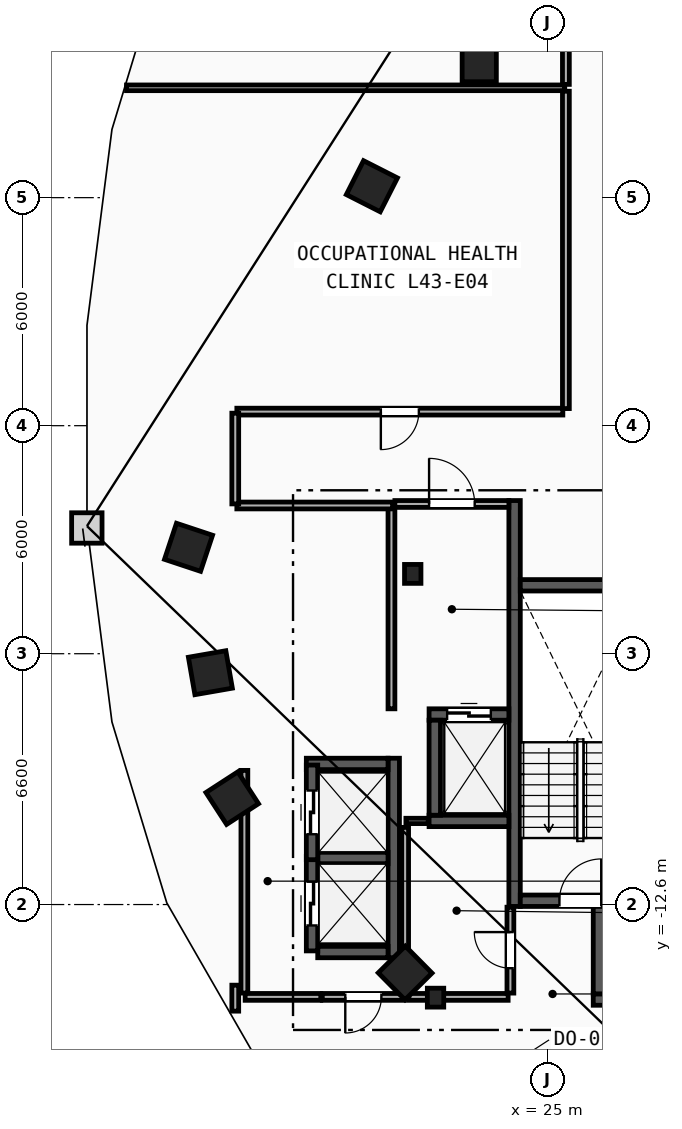
"""IFC4 building model, lengths in metres.
Left out: names, types, materials, properties, quantities, classifications, styles, units other than length and angle.
Written with IfcOpenShell. Run it as: python <this file> out.ifc"""

import sys

from ifc_helpers import new_model, si_unit, direction, frame, frame_2d, origin, origin_2d, place, context, subcontext, project, spatial, rectangle, i_section, extrude, element, fill, save


model = new_model("IFC4")
c1 = context("Model", 3, precision=1e-05, world=origin(), true_north=direction((0.0, 1.0)))
c2 = subcontext(c1, "Body", "Model", "MODEL_VIEW")
j1 = project(units=[si_unit("LENGTHUNIT", "METRE"), si_unit("PLANEANGLEUNIT", "RADIAN")], contexts=[c1])
p1 = place(None, origin())
s1 = spatial("IfcSite", under=j1, at=p1, CompositionType="ELEMENT")
p2 = place(p1, origin())
s2 = spatial("IfcBuilding", under=s1, at=p2, CompositionType="ELEMENT")
p3 = place(p2, frame((0.0, 0.0, 165.6)))
s3 = spatial("IfcBuildingStorey", under=s2, at=p3, CompositionType="ELEMENT", Elevation=165.6)
for number, where, z_axis, x_axis in (
    (1, (21.45, -3.9, 0.0), (0.0, 0.0, 1.0), (1.0, 0.0, 0.0)),
    (2, (22.05, -15.05, 0.0), (0.0, 0.0, 1.0), (1.0, 0.0, 0.0)),
):
    element("IfcColumn", number, at=place(p3, frame(where, z_axis=z_axis, x_axis=x_axis)), inside=s3, PredefinedType="COLUMN", context=c2, shape_type="SweptSolid", body=[
        extrude(i_section(OverallWidth=0.432, OverallDepth=0.498, WebThickness=0.056, FlangeThickness=0.089, FilletRadius=0.018, at=origin_2d()), origin(), (0.0, 0.0, 1.0), 3.6),
    ])
p4 = place(p3, frame((23.2, 9.5, 0.0), z_axis=(0.0, 0.0, 1.0), x_axis=(1.0, 0.0, 0.0)))
e3 = element("IfcColumn", 3, at=p4, inside=s3, PredefinedType="COLUMN", context=c2, shape_type="SweptSolid", body=[
    extrude(rectangle(XDim=0.9, YDim=0.9, at=origin_2d()), origin(), (0.0, 0.0, 1.0), 3.6),
])
for number, where, z_axis, x_axis in (
    (4, (15.55, -3.2, 0.0), (0.0, 0.0, 1.0), (-0.315, -0.949, 0.0)),
    (5, (16.125, -6.5, 0.0), (0.0, 0.0, 1.0), (0.172, -0.985, 0.0)),
    (6, (16.7, -9.8, 0.0), (0.0, 0.0, 1.0), (0.544, -0.839, 0.0)),
    (7, (21.25, -14.4, 0.0), (0.0, 0.0, 1.0), (0.703, -0.711, 0.0)),
    (8, (20.375, 6.3, 0.0), (0.0, 0.0, 1.0), (-0.453, -0.892, 0.0)),
):
    element("IfcColumn", number, at=place(p3, frame(where, z_axis=z_axis, x_axis=x_axis)), inside=s3, PredefinedType="COLUMN", context=c2, shape_type="SweptSolid", body=[
        extrude(rectangle(XDim=1.0, YDim=1.0, at=origin_2d()), origin(), (0.0, 0.0, 1.0), 3.6),
    ])
p5 = place(p3, frame((24.13, -12.65, 0.0), z_axis=(0.0, 0.0, 1.0), x_axis=(0.0, 1.0, 0.0)))
e9 = element("IfcWall", 9, at=p5, inside=s3, PredefinedType="SHEAR", context=c2, shape_type="SweptSolid", body=[
    extrude(rectangle(XDim=10.68, YDim=0.3, at=frame_2d((5.34, 0.0))), origin(), (0.0, 0.0, 1.0), 3.36),
])
p6 = place(p3, frame((24.28, -12.5, 0.0), z_axis=(0.0, 0.0, 1.0), x_axis=(1.0, 0.0, 0.0)))
e10 = element("IfcWall", 10, at=p6, inside=s3, PredefinedType="SHEAR", context=c2, shape_type="SweptSolid", body=[
    extrude(rectangle(XDim=3.16, YDim=0.3, at=frame_2d((1.58, 0.0))), origin(), (0.0, 0.0, 1.0), 3.36),
])
p7 = place(p6, frame((1.03, 0.0, 0.0)))
e11 = element("IfcOpeningElement", 11, at=p7, cuts=e10, PredefinedType="OPENING", context=c2, shape_type="SweptSolid", body=[
    extrude(rectangle(XDim=1.1, YDim=2.15, at=frame_2d((0.55, 1.075))), frame((0.0, 0.16, 0.0), z_axis=(0.0, -1.0, 0.0), x_axis=(1.0, 0.0, 0.0)), (0.0, 0.0, 1.0), 0.32),
])
p8 = place(p3, frame((24.28, -4.2, 0.0), z_axis=(0.0, 0.0, 1.0), x_axis=(1.0, 0.0, 0.0)))
e12 = element("IfcWall", 12, at=p8, inside=s3, PredefinedType="SHEAR", context=c2, shape_type="SweptSolid", body=[
    extrude(rectangle(XDim=3.16, YDim=0.3, at=frame_2d((1.58, 0.0))), origin(), (0.0, 0.0, 1.0), 3.36),
])
p9 = place(p3, frame((20.89, -7.45, 0.0), z_axis=(0.0, 0.0, 1.0), x_axis=(0.0, 1.0, 0.0)))
e13 = element("IfcWall", 13, at=p9, inside=s3, PredefinedType="PARTITIONING", context=c2, shape_type="SweptSolid", body=[
    extrude(rectangle(XDim=5.3, YDim=0.18, at=frame_2d((2.65, 0.0))), origin(), (0.0, 0.0, 1.0), 3.36),
])
p10 = place(p3, frame((20.98, -2.06, 0.0), z_axis=(0.0, 0.0, 1.0), x_axis=(1.0, 0.0, 0.0)))
e14 = element("IfcWall", 14, at=p10, inside=s3, PredefinedType="PARTITIONING", context=c2, shape_type="SweptSolid", body=[
    extrude(rectangle(XDim=3.0, YDim=0.18, at=frame_2d((1.5, 0.0))), origin(), (0.0, 0.0, 1.0), 3.36),
])
p11 = place(p10, frame((0.9, 0.0, 0.0)))
e15 = element("IfcOpeningElement", 15, at=p11, cuts=e14, PredefinedType="OPENING", context=c2, shape_type="SweptSolid", body=[
    extrude(rectangle(XDim=1.2, YDim=2.15, at=frame_2d((0.6, 1.075))), frame((0.0, 0.1, 0.0), z_axis=(0.0, -1.0, 0.0), x_axis=(1.0, 0.0, 0.0)), (0.0, 0.0, 1.0), 0.2),
])
p12 = place(p3, frame((21.88, -7.6, 0.0), z_axis=(0.0, 0.0, 1.0), x_axis=(1.0, 0.0, 0.0)))
e16 = element("IfcWall", 16, at=p12, inside=s3, PredefinedType="SHEAR", context=c2, shape_type="SweptSolid", body=[
    extrude(rectangle(XDim=2.1, YDim=0.3, at=frame_2d((1.05, 0.0))), origin(), (0.0, 0.0, 1.0), 3.36),
])
p13 = place(p12, frame((0.475, 0.0, 0.0)))
e17 = element("IfcOpeningElement", 17, at=p13, cuts=e16, PredefinedType="OPENING", context=c2, shape_type="SweptSolid", body=[
    extrude(rectangle(XDim=1.15, YDim=2.2, at=frame_2d((0.575, 1.1))), frame((0.0, 0.16, 0.0), z_axis=(0.0, -1.0, 0.0), x_axis=(1.0, 0.0, 0.0)), (0.0, 0.0, 1.0), 0.32),
])
p14 = place(p3, frame((21.88, -10.4, 0.0), z_axis=(0.0, 0.0, 1.0), x_axis=(1.0, 0.0, 0.0)))
e18 = element("IfcWall", 18, at=p14, inside=s3, PredefinedType="SHEAR", context=c2, shape_type="SweptSolid", body=[
    extrude(rectangle(XDim=2.1, YDim=0.3, at=frame_2d((1.05, 0.0))), origin(), (0.0, 0.0, 1.0), 3.36),
])
for number, where, z_axis, x_axis in (
    (19, (22.03, -10.25, 0.0), (0.0, 0.0, 1.0), (0.0, 1.0, 0.0)),
    (20, (26.2, -15.1, 0.0), (0.0, 0.0, 1.0), (1.0, 0.0, 0.0)),
):
    element("IfcWall", number, at=place(p3, frame(where, z_axis=z_axis, x_axis=x_axis)), inside=s3, PredefinedType="SHEAR", context=c2, shape_type="SweptSolid", body=[
        extrude(rectangle(XDim=2.5, YDim=0.3, at=frame_2d((1.25, 0.0))), origin(), (0.0, 0.0, 1.0), 3.36),
    ])
p15 = place(p3, frame((26.35, -14.95, 0.0), z_axis=(0.0, 0.0, 1.0), x_axis=(0.0, 1.0, 0.0)))
e21 = element("IfcWall", 21, at=p15, inside=s3, PredefinedType="SHEAR", context=c2, shape_type="SweptSolid", body=[
    extrude(rectangle(XDim=2.3, YDim=0.3, at=frame_2d((1.15, 0.0))), origin(), (0.0, 0.0, 1.0), 3.36),
])
p16 = place(p3, frame((20.95, -14.0, 0.0), z_axis=(0.0, 0.0, 1.0), x_axis=(0.0, 1.0, 0.0)))
e22 = element("IfcWall", 22, at=p16, inside=s3, PredefinedType="SHEAR", context=c2, shape_type="SweptSolid", body=[
    extrude(rectangle(XDim=5.25, YDim=0.3, at=frame_2d((2.625, 0.0))), origin(), (0.0, 0.0, 1.0), 3.36),
])
p17 = place(p3, frame((18.95, -13.85, 0.0), z_axis=(0.0, 0.0, 1.0), x_axis=(1.0, 0.0, 0.0)))
e23 = element("IfcWall", 23, at=p17, inside=s3, PredefinedType="SHEAR", context=c2, shape_type="SweptSolid", body=[
    extrude(rectangle(XDim=1.85, YDim=0.3, at=frame_2d((0.925, 0.0))), origin(), (0.0, 0.0, 1.0), 3.36),
])
p18 = place(p3, frame((18.65, -8.9, 0.0), z_axis=(0.0, 0.0, 1.0), x_axis=(1.0, 0.0, 0.0)))
e24 = element("IfcWall", 24, at=p18, inside=s3, PredefinedType="SHEAR", context=c2, shape_type="SweptSolid", body=[
    extrude(rectangle(XDim=2.15, YDim=0.3, at=frame_2d((1.075, 0.0))), origin(), (0.0, 0.0, 1.0), 3.36),
])
p19 = place(p3, frame((18.95, -11.375, 0.0), z_axis=(0.0, 0.0, 1.0), x_axis=(1.0, 0.0, 0.0)))
e25 = element("IfcWall", 25, at=p19, inside=s3, PredefinedType="SHEAR", context=c2, shape_type="SweptSolid", body=[
    extrude(rectangle(XDim=1.85, YDim=0.3, at=frame_2d((0.925, 0.0))), origin(), (0.0, 0.0, 1.0), 3.36),
])
p20 = place(p3, frame((18.8, -13.82, 0.0), z_axis=(0.0, 0.0, 1.0), x_axis=(0.0, 1.0, 0.0)))
e26 = element("IfcWall", 26, at=p20, inside=s3, PredefinedType="SHEAR", context=c2, shape_type="SweptSolid", body=[
    extrude(rectangle(XDim=2.49, YDim=0.3, at=frame_2d((1.245, 0.0))), origin(), (0.0, 0.0, 1.0), 3.36),
])
p21 = place(p20, frame((0.67, 0.0, 0.0)))
e27 = element("IfcOpeningElement", 27, at=p21, cuts=e26, PredefinedType="OPENING", context=c2, shape_type="SweptSolid", body=[
    extrude(rectangle(XDim=1.15, YDim=2.2, at=frame_2d((0.575, 1.1))), frame((0.0, 0.16, 0.0), z_axis=(0.0, -1.0, 0.0), x_axis=(1.0, 0.0, 0.0)), (0.0, 0.0, 1.0), 0.32),
])
p22 = place(p3, frame((18.8, -11.42, 0.0), z_axis=(0.0, 0.0, 1.0), x_axis=(0.0, 1.0, 0.0)))
e28 = element("IfcWall", 28, at=p22, inside=s3, PredefinedType="SHEAR", context=c2, shape_type="SweptSolid", body=[
    extrude(rectangle(XDim=2.49, YDim=0.3, at=frame_2d((1.245, 0.0))), origin(), (0.0, 0.0, 1.0), 3.36),
])
p23 = place(p22, frame((0.67, 0.0, 0.0)))
e29 = element("IfcOpeningElement", 29, at=p23, cuts=e28, PredefinedType="OPENING", context=c2, shape_type="SweptSolid", body=[
    extrude(rectangle(XDim=1.15, YDim=2.2, at=frame_2d((0.575, 1.1))), frame((0.0, 0.16, 0.0), z_axis=(0.0, -1.0, 0.0), x_axis=(1.0, 0.0, 0.0)), (0.0, 0.0, 1.0), 0.32),
])
p24 = place(p3, frame((17.02, -14.93, 0.0), z_axis=(0.0, 0.0, 1.0), x_axis=(0.0, 1.0, 0.0)))
e30 = element("IfcWall", 30, at=p24, inside=s3, PredefinedType="PARTITIONING", context=c2, shape_type="SweptSolid", body=[
    extrude(rectangle(XDim=5.86, YDim=0.18, at=frame_2d((2.93, 0.0))), origin(), (0.0, 0.0, 1.0), 3.36),
])
p25 = place(p3, frame((17.04, -15.03, 0.0), z_axis=(0.0, 0.0, 1.0), x_axis=(1.0, 0.0, 0.0)))
e31 = element("IfcWall", 31, at=p25, inside=s3, PredefinedType="PARTITIONING", context=c2, shape_type="SweptSolid", body=[
    extrude(rectangle(XDim=1.99, YDim=0.18, at=frame_2d((0.995, 0.0))), origin(), (0.0, 0.0, 1.0), 3.36),
])
p26 = place(p3, frame((21.23, -15.03, 0.0), z_axis=(0.0, 0.0, 1.0), x_axis=(-1.0, 0.0, 0.0)))
e32 = element("IfcWall", 32, at=p26, inside=s3, PredefinedType="PARTITIONING", context=c2, shape_type="SweptSolid", body=[
    extrude(rectangle(XDim=2.16, YDim=0.18, at=frame_2d((1.08, 0.0))), origin(), (0.0, 0.0, 1.0), 3.36),
])
p27 = place(p26, frame((0.605, 0.0, 0.0)))
e33 = element("IfcOpeningElement", 33, at=p27, cuts=e32, PredefinedType="OPENING", context=c2, shape_type="SweptSolid", body=[
    extrude(rectangle(XDim=0.95, YDim=2.1, at=frame_2d((0.475, 1.05))), frame((0.0, 0.1, 0.0), z_axis=(0.0, -1.0, 0.0), x_axis=(1.0, 0.0, 0.0)), (0.0, 0.0, 1.0), 0.2),
])
p28 = place(p3, frame((21.27, -10.4, 0.0), z_axis=(0.0, 0.0, 1.0), x_axis=(1.0, 0.0, 0.0)))
e34 = element("IfcWall", 34, at=p28, inside=s3, PredefinedType="PARTITIONING", context=c2, shape_type="SweptSolid", body=[
    extrude(rectangle(XDim=0.59, YDim=0.14, at=frame_2d((0.295, 0.0))), origin(), (0.0, 0.0, 1.0), 3.36),
])
p29 = place(p3, frame((21.25, -14.93, 0.0), z_axis=(0.0, 0.0, 1.0), x_axis=(0.0, 1.0, 0.0)))
e35 = element("IfcWall", 35, at=p29, inside=s3, PredefinedType="PARTITIONING", context=c2, shape_type="SweptSolid", body=[
    extrude(rectangle(XDim=4.36, YDim=0.18, at=frame_2d((2.18, 0.0))), origin(), (0.0, 0.0, 1.0), 3.36),
])
p30 = place(p3, frame((21.35, -15.03, 0.0), z_axis=(0.0, 0.0, 1.0), x_axis=(1.0, 0.0, 0.0)))
e36 = element("IfcWall", 36, at=p30, inside=s3, PredefinedType="PARTITIONING", context=c2, shape_type="SweptSolid", body=[
    extrude(rectangle(XDim=2.61, YDim=0.18, at=frame_2d((1.305, 0.0))), origin(), (0.0, 0.0, 1.0), 2.433),
])
p31 = place(p3, frame((24.02, -14.93, 0.0), z_axis=(0.0, 0.0, 1.0), x_axis=(0.0, 1.0, 0.0)))
e37 = element("IfcWall", 37, at=p31, inside=s3, PredefinedType="PARTITIONING", context=c2, shape_type="SweptSolid", body=[
    extrude(rectangle(XDim=2.26, YDim=0.18, at=frame_2d((1.13, 0.0))), origin(), (0.0, 0.0, 1.0), 3.36),
])
p32 = place(p31, frame((0.655, 0.0, 0.0)))
e38 = element("IfcOpeningElement", 38, at=p32, cuts=e37, PredefinedType="OPENING", context=c2, shape_type="SweptSolid", body=[
    extrude(rectangle(XDim=0.95, YDim=2.1, at=frame_2d((0.475, 1.05))), frame((0.0, 0.1, 0.0), z_axis=(0.0, -1.0, 0.0), x_axis=(1.0, 0.0, 0.0)), (0.0, 0.0, 1.0), 0.2),
])
p33 = place(p3, frame((13.918, 8.89, 0.0), z_axis=(0.0, 0.0, 1.0), x_axis=(1.0, 0.0, 0.0)))
e39 = element("IfcWall", 39, at=p33, inside=s3, PredefinedType="PARTITIONING", context=c2, shape_type="SweptSolid", body=[
    extrude(rectangle(XDim=11.532, YDim=0.15, at=frame_2d((5.766, 0.0))), origin(), (0.0, 0.0, 1.0), 3.36),
])
p34 = place(p3, frame((25.4, 0.37, 0.0), z_axis=(0.0, 0.0, 1.0), x_axis=(-1.0, 0.0, 0.0)))
e40 = element("IfcWall", 40, at=p34, inside=s3, PredefinedType="PARTITIONING", context=c2, shape_type="SweptSolid", body=[
    extrude(rectangle(XDim=8.578, YDim=0.18, at=frame_2d((4.289, 0.0))), origin(), (0.0, 0.0, 1.0), 3.36),
])
p35 = place(p34, frame((3.789, 0.0, 0.0)))
e41 = element("IfcOpeningElement", 41, at=p35, cuts=e40, PredefinedType="OPENING", context=c2, shape_type="SweptSolid", body=[
    extrude(rectangle(XDim=1.0, YDim=2.15, at=frame_2d((0.5, 1.075))), frame((0.0, 0.1, 0.0), z_axis=(0.0, -1.0, 0.0), x_axis=(1.0, 0.0, 0.0)), (0.0, 0.0, 1.0), 0.2),
])
p36 = place(p3, frame((25.48, 8.8, 0.0), z_axis=(0.0, 0.0, 1.0), x_axis=(0.0, -1.0, 0.0)))
e42 = element("IfcWall", 42, at=p36, inside=s3, PredefinedType="PARTITIONING", context=c2, shape_type="SweptSolid", body=[
    extrude(rectangle(XDim=8.35, YDim=0.18, at=frame_2d((4.175, 0.0))), origin(), (0.0, 0.0, 1.0), 3.36),
])
p37 = place(p3, frame((16.822, -2.1, 0.0), z_axis=(0.0, 0.0, 1.0), x_axis=(1.0, 0.0, 0.0)))
e43 = element("IfcWall", 43, at=p37, inside=s3, PredefinedType="PARTITIONING", context=c2, shape_type="SweptSolid", body=[
    extrude(rectangle(XDim=4.098, YDim=0.18, at=frame_2d((2.049, 0.0))), origin(), (0.0, 0.0, 1.0), 3.36),
])
p38 = place(p3, frame((16.78, 0.329, 0.0), z_axis=(0.0, 0.0, 1.0), x_axis=(0.0, -1.0, 0.0)))
e44 = element("IfcWall", 44, at=p38, inside=s3, PredefinedType="PARTITIONING", context=c2, shape_type="SweptSolid", body=[
    extrude(rectangle(XDim=2.387, YDim=0.18, at=frame_2d((1.194, 0.0))), origin(), (0.0, 0.0, 1.0), 3.36),
])
p39 = place(p3, frame((16.78, -14.721, 0.0), z_axis=(0.0, 0.0, 1.0), x_axis=(0.0, -1.0, 0.0)))
e45 = element("IfcWall", 45, at=p39, inside=s3, PredefinedType="PARTITIONING", context=c2, shape_type="SweptSolid", body=[
    extrude(rectangle(XDim=0.684, YDim=0.18, at=frame_2d((0.342, 0.0))), origin(), (0.0, 0.0, 1.0), 3.36),
])
p40 = place(p3, frame((25.48, 11.178, 0.0), z_axis=(0.0, 0.0, 1.0), x_axis=(0.0, -1.0, 0.0)))
e46 = element("IfcWall", 46, at=p40, inside=s3, PredefinedType="PARTITIONING", context=c2, shape_type="SweptSolid", body=[
    extrude(rectangle(XDim=2.198, YDim=0.18, at=frame_2d((1.099, 0.0))), origin(), (0.0, 0.0, 1.0), 3.36),
])
p41 = place(p7, origin())
e47 = element("IfcDoor", 47, at=p41, inside=s3, OperationType="SINGLE_SWING_RIGHT", PredefinedType="DOOR", context=c2, shape_type="SweptSolid", body=[
    extrude(rectangle(XDim=1.1, YDim=2.15, at=frame_2d((0.55, 1.075))), frame((0.0, 0.025, 0.0), z_axis=(0.0, -1.0, 0.0), x_axis=(1.0, 0.0, 0.0)), (0.0, 0.0, 1.0), 0.05),
])
fill(e11, e47)
p42 = place(p11, origin())
e48 = element("IfcDoor", 48, at=p42, inside=s3, OperationType="SINGLE_SWING_LEFT", PredefinedType="DOOR", context=c2, shape_type="SweptSolid", body=[
    extrude(rectangle(XDim=1.2, YDim=2.15, at=frame_2d((0.6, 1.075))), frame((0.0, 0.025, 0.0), z_axis=(0.0, -1.0, 0.0), x_axis=(1.0, 0.0, 0.0)), (0.0, 0.0, 1.0), 0.05),
])
fill(e15, e48)
p43 = place(p13, origin())
e49 = element("IfcDoor", 49, at=p43, inside=s3, OperationType="SLIDING_TO_LEFT", PredefinedType="TRAPDOOR", context=c2, shape_type="SweptSolid", body=[
    extrude(rectangle(XDim=1.15, YDim=2.2, at=frame_2d((0.575, 1.1))), frame((0.0, 0.025, 0.0), z_axis=(0.0, -1.0, 0.0), x_axis=(1.0, 0.0, 0.0)), (0.0, 0.0, 1.0), 0.05),
])
fill(e17, e49)
p44 = place(p21, origin())
e50 = element("IfcDoor", 50, at=p44, inside=s3, OperationType="SLIDING_TO_LEFT", PredefinedType="TRAPDOOR", context=c2, shape_type="SweptSolid", body=[
    extrude(rectangle(XDim=1.15, YDim=2.2, at=frame_2d((0.575, 1.1))), frame((0.0, 0.025, 0.0), z_axis=(0.0, -1.0, 0.0), x_axis=(1.0, 0.0, 0.0)), (0.0, 0.0, 1.0), 0.05),
])
fill(e27, e50)
p45 = place(p23, origin())
e51 = element("IfcDoor", 51, at=p45, inside=s3, OperationType="SLIDING_TO_LEFT", PredefinedType="TRAPDOOR", context=c2, shape_type="SweptSolid", body=[
    extrude(rectangle(XDim=1.15, YDim=2.2, at=frame_2d((0.575, 1.1))), frame((0.0, 0.025, 0.0), z_axis=(0.0, -1.0, 0.0), x_axis=(1.0, 0.0, 0.0)), (0.0, 0.0, 1.0), 0.05),
])
fill(e29, e51)
p46 = place(p35, origin())
e52 = element("IfcDoor", 52, at=p46, inside=s3, OperationType="SINGLE_SWING_RIGHT", PredefinedType="DOOR", context=c2, shape_type="SweptSolid", body=[
    extrude(rectangle(XDim=1.0, YDim=2.15, at=frame_2d((0.5, 1.075))), frame((0.0, 0.025, 0.0), z_axis=(0.0, -1.0, 0.0), x_axis=(1.0, 0.0, 0.0)), (0.0, 0.0, 1.0), 0.05),
])
fill(e41, e52)
p47 = place(p32, origin())
e53 = element("IfcDoor", 53, at=p47, inside=s3, OperationType="SINGLE_SWING_RIGHT", PredefinedType="DOOR", context=c2, shape_type="SweptSolid", body=[
    extrude(rectangle(XDim=0.95, YDim=2.1, at=frame_2d((0.475, 1.05))), frame((0.0, 0.025, 0.0), z_axis=(0.0, -1.0, 0.0), x_axis=(1.0, 0.0, 0.0)), (0.0, 0.0, 1.0), 0.05),
])
fill(e38, e53)
p48 = place(p27, origin())
e54 = element("IfcDoor", 54, at=p48, inside=s3, OperationType="SINGLE_SWING_RIGHT", PredefinedType="DOOR", context=c2, shape_type="SweptSolid", body=[
    extrude(rectangle(XDim=0.95, YDim=2.1, at=frame_2d((0.475, 1.05))), frame((0.0, 0.025, 0.0), z_axis=(0.0, -1.0, 0.0), x_axis=(1.0, 0.0, 0.0)), (0.0, 0.0, 1.0), 0.05),
])
fill(e33, e54)
save(model, sys.argv[1])
